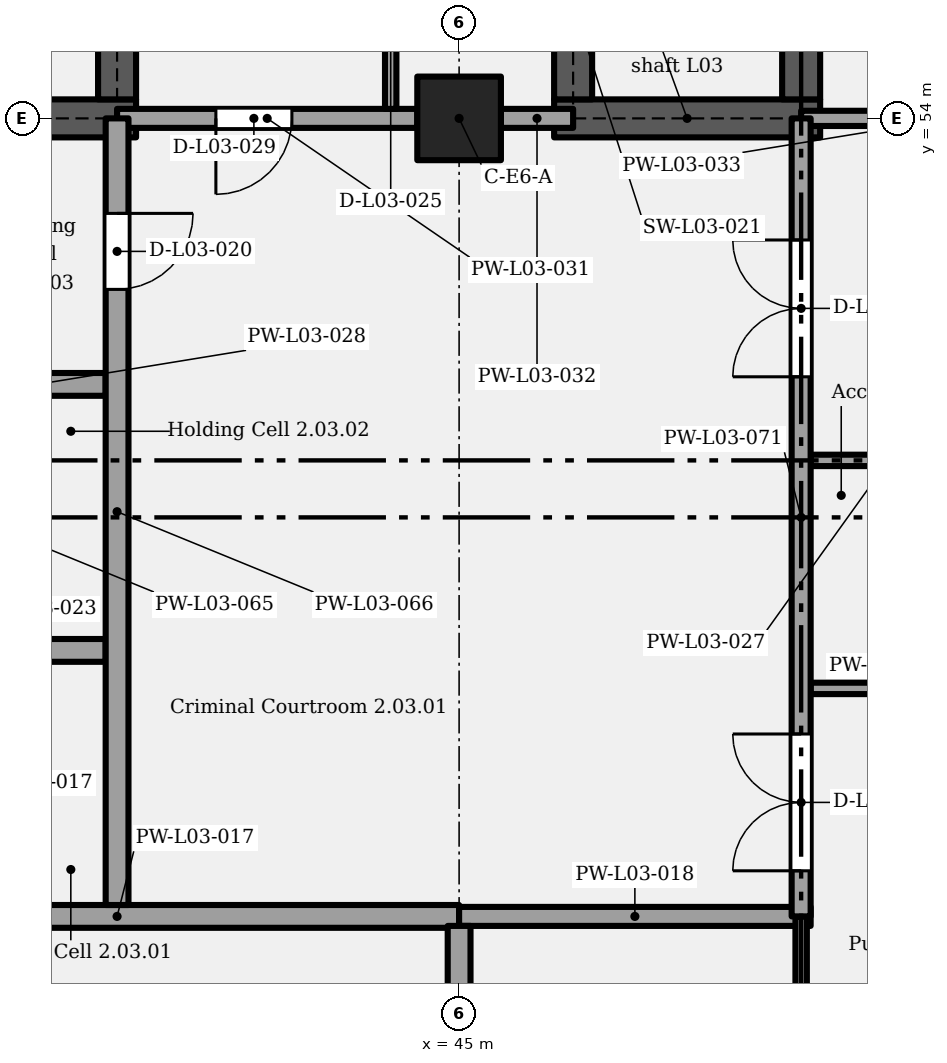
"""IFC4 building model, lengths in metres.
Left out: names, types, materials, properties, quantities, classifications, styles, units other than length and angle.
Written with IfcOpenShell. Run it as: python <this file> out.ifc"""

import sys

from ifc_helpers import new_model, si_unit, direction, frame, frame_2d, origin, origin_2d, place, context, subcontext, project, spatial, rectangle, extrude, element, fill, save


model = new_model("IFC4")
c1 = context("Model", 3, precision=1e-05, world=origin(), true_north=direction((0.0, 1.0)))
c2 = subcontext(c1, "Body", "Model", "MODEL_VIEW")
j1 = project(units=[si_unit("LENGTHUNIT", "METRE"), si_unit("PLANEANGLEUNIT", "RADIAN")], contexts=[c1])
p1 = place(None, origin())
s1 = spatial("IfcSite", under=j1, at=p1, CompositionType="ELEMENT")
p2 = place(p1, origin())
s2 = spatial("IfcBuilding", under=s1, at=p2, CompositionType="ELEMENT")
p3 = place(p2, frame((0.0, 0.0, 17.4)))
s3 = spatial("IfcBuildingStorey", under=s2, at=p3, CompositionType="ELEMENT", Elevation=17.4)
p4 = place(p3, frame((45.0, 54.0, 0.0), z_axis=(0.0, 0.0, 1.0), x_axis=(1.0, 0.0, 0.0)))
e1 = element("IfcColumn", 1, at=p4, inside=s3, PredefinedType="COLUMN", context=c2, shape_type="SweptSolid", body=[
    extrude(rectangle(XDim=1.1, YDim=1.1, at=origin_2d()), origin(), (0.0, 0.0, 1.0), 5.4),
])
p5 = place(p3, frame((38.15, 54.0, 0.0), z_axis=(0.0, 0.0, 1.0), x_axis=(1.0, 0.0, 0.0)))
e2 = element("IfcWall", 2, at=p5, inside=s3, PredefinedType="SHEAR", context=c2, shape_type="SweptSolid", body=[
    extrude(rectangle(XDim=2.6, YDim=0.5, at=frame_2d((1.3, 0.0))), origin(), (0.0, 0.0, 1.0), 5.15),
])
p6 = place(p3, frame((46.25, 54.0, 0.0), z_axis=(0.0, 0.0, 1.0), x_axis=(1.0, 0.0, 0.0)))
e3 = element("IfcWall", 3, at=p6, inside=s3, PredefinedType="SHEAR", context=c2, shape_type="SweptSolid", body=[
    extrude(rectangle(XDim=3.5, YDim=0.5, at=frame_2d((1.75, 0.0))), origin(), (0.0, 0.0, 1.0), 5.15),
])
p7 = place(p3, frame((40.5, 54.25, 0.0), z_axis=(0.0, 0.0, 1.0), x_axis=(0.0, 1.0, 0.0)))
e4 = element("IfcWall", 4, at=p7, inside=s3, PredefinedType="SHEAR", context=c2, shape_type="SweptSolid", body=[
    extrude(rectangle(XDim=11.5, YDim=0.5, at=frame_2d((5.75, 0.0))), origin(), (0.0, 0.0, 1.0), 5.15),
])
p8 = place(p3, frame((46.5, 54.25, 0.0), z_axis=(0.0, 0.0, 1.0), x_axis=(0.0, 1.0, 0.0)))
e5 = element("IfcWall", 5, at=p8, inside=s3, PredefinedType="SHEAR", context=c2, shape_type="SweptSolid", body=[
    extrude(rectangle(XDim=2.5, YDim=0.5, at=frame_2d((1.25, 0.0))), origin(), (0.0, 0.0, 1.0), 5.15),
])
p9 = place(p3, frame((49.5, 54.25, 0.0), z_axis=(0.0, 0.0, 1.0), x_axis=(0.0, 1.0, 0.0)))
e6 = element("IfcWall", 6, at=p9, inside=s3, PredefinedType="SHEAR", context=c2, shape_type="SweptSolid", body=[
    extrude(rectangle(XDim=11.5, YDim=0.5, at=frame_2d((5.75, 0.0))), origin(), (0.0, 0.0, 1.0), 5.15),
])
p10 = place(p9, frame((0.7, 0.0, 0.0)))
e7 = element("IfcOpeningElement", 7, at=p10, cuts=e6, PredefinedType="OPENING", context=c2, shape_type="SweptSolid", body=[
    extrude(rectangle(XDim=1.1, YDim=2.1, at=frame_2d((0.55, 1.05))), frame((0.0, 0.26, 0.0), z_axis=(0.0, -1.0, 0.0), x_axis=(1.0, 0.0, 0.0)), (0.0, 0.0, 1.0), 0.52),
])
p11 = place(p9, frame((4.35, 0.0, 0.0), z_axis=(0.0, 0.0, 1.0), x_axis=(-1.0, 0.0, 0.0)))
e8 = element("IfcOpeningElement", 8, at=p11, cuts=e6, PredefinedType="OPENING", context=c2, shape_type="SweptSolid", body=[
    extrude(rectangle(XDim=1.2, YDim=2.1, at=frame_2d((0.6, 1.05))), frame((0.0, 0.26, 0.0), z_axis=(0.0, -1.0, 0.0), x_axis=(1.0, 0.0, 0.0)), (0.0, 0.0, 1.0), 0.52),
])
p12 = place(p3, frame((36.0, 43.5, 0.0), z_axis=(0.0, 0.0, 1.0), x_axis=(1.0, 0.0, 0.0)))
e9 = element("IfcWall", 9, at=p12, inside=s3, PredefinedType="PARTITIONING", context=c2, shape_type="SweptSolid", body=[
    extrude(rectangle(XDim=9.0, YDim=0.3, at=frame_2d((4.5, 0.0))), origin(), (0.0, 0.0, 1.0), 5.15),
])
p13 = place(p12, frame((1.35, 0.0, 0.0), z_axis=(0.0, 0.0, 1.0), x_axis=(-1.0, 0.0, 0.0)))
e10 = element("IfcOpeningElement", 10, at=p13, cuts=e9, PredefinedType="OPENING", context=c2, shape_type="SweptSolid", body=[
    extrude(rectangle(XDim=0.9, YDim=2.1, at=frame_2d((0.45, 1.05))), frame((0.0, 0.16, 0.0), z_axis=(0.0, -1.0, 0.0), x_axis=(1.0, 0.0, 0.0)), (0.0, 0.0, 1.0), 0.32),
])
p14 = place(p3, frame((45.0, 43.5, 0.0), z_axis=(0.0, 0.0, 1.0), x_axis=(1.0, 0.0, 0.0)))
e11 = element("IfcWall", 11, at=p14, inside=s3, PredefinedType="PARTITIONING", context=c2, shape_type="SweptSolid", body=[
    extrude(rectangle(XDim=4.625, YDim=0.25, at=frame_2d((2.312, 0.0))), origin(), (0.0, 0.0, 1.0), 5.15),
])
p15 = place(p3, frame((49.625, 46.5, 0.0), z_axis=(0.0, 0.0, 1.0), x_axis=(1.0, 0.0, 0.0)))
e12 = element("IfcWall", 12, at=p15, inside=s3, PredefinedType="PARTITIONING", context=c2, shape_type="SweptSolid", body=[
    extrude(rectangle(XDim=2.05, YDim=0.15, at=frame_2d((1.025, 0.0))), origin(), (0.0, 0.0, 1.0), 5.15),
])
p16 = place(p3, frame((38.55, 47.0, 0.0), z_axis=(0.0, 0.0, 1.0), x_axis=(1.0, 0.0, 0.0)))
e13 = element("IfcWall", 13, at=p16, inside=s3, PredefinedType="PARTITIONING", context=c2, shape_type="SweptSolid", body=[
    extrude(rectangle(XDim=1.8, YDim=0.3, at=frame_2d((0.9, 0.0))), origin(), (0.0, 0.0, 1.0), 5.15),
])
p17 = place(p3, frame((49.625, 49.5, 0.0), z_axis=(0.0, 0.0, 1.0), x_axis=(1.0, 0.0, 0.0)))
e14 = element("IfcWall", 14, at=p17, inside=s3, PredefinedType="PARTITIONING", context=c2, shape_type="SweptSolid", body=[
    extrude(rectangle(XDim=2.05, YDim=0.15, at=frame_2d((1.025, 0.0))), origin(), (0.0, 0.0, 1.0), 5.15),
])
p18 = place(p3, frame((38.55, 50.5, 0.0), z_axis=(0.0, 0.0, 1.0), x_axis=(1.0, 0.0, 0.0)))
e15 = element("IfcWall", 15, at=p18, inside=s3, PredefinedType="PARTITIONING", context=c2, shape_type="SweptSolid", body=[
    extrude(rectangle(XDim=1.8, YDim=0.3, at=frame_2d((0.9, 0.0))), origin(), (0.0, 0.0, 1.0), 5.15),
])
p19 = place(p3, frame((40.5, 54.0, 0.0), z_axis=(0.0, 0.0, 1.0), x_axis=(1.0, 0.0, 0.0)))
e16 = element("IfcWall", 16, at=p19, inside=s3, PredefinedType="PARTITIONING", context=c2, shape_type="SweptSolid", body=[
    extrude(rectangle(XDim=3.95, YDim=0.25, at=frame_2d((1.975, 0.0))), origin(), (0.0, 0.0, 1.0), 4.4),
])
p20 = place(p19, frame((2.3, 0.0, 0.0), z_axis=(0.0, 0.0, 1.0), x_axis=(-1.0, 0.0, 0.0)))
e17 = element("IfcOpeningElement", 17, at=p20, cuts=e16, PredefinedType="OPENING", context=c2, shape_type="SweptSolid", body=[
    extrude(rectangle(XDim=1.0, YDim=2.1, at=frame_2d((0.5, 1.05))), frame((0.0, 0.135, 0.0), z_axis=(0.0, -1.0, 0.0), x_axis=(1.0, 0.0, 0.0)), (0.0, 0.0, 1.0), 0.27),
])
p21 = place(p3, frame((45.55, 54.0, 0.0), z_axis=(0.0, 0.0, 1.0), x_axis=(1.0, 0.0, 0.0)))
e18 = element("IfcWall", 18, at=p21, inside=s3, PredefinedType="PARTITIONING", context=c2, shape_type="SweptSolid", body=[
    extrude(rectangle(XDim=0.95, YDim=0.25, at=frame_2d((0.475, 0.0))), origin(), (0.0, 0.0, 1.0), 4.4),
])
p22 = place(p3, frame((49.5, 54.0, 0.0), z_axis=(0.0, 0.0, 1.0), x_axis=(1.0, 0.0, 0.0)))
e19 = element("IfcWall", 19, at=p22, inside=s3, PredefinedType="PARTITIONING", context=c2, shape_type="SweptSolid", body=[
    extrude(rectangle(XDim=3.95, YDim=0.2, at=frame_2d((1.975, 0.0))), origin(), (0.0, 0.0, 1.0), 4.4),
])
p23 = place(p22, frame((1.35, 0.0, 0.0)))
e20 = element("IfcOpeningElement", 20, at=p23, cuts=e19, PredefinedType="OPENING", context=c2, shape_type="SweptSolid", body=[
    extrude(rectangle(XDim=1.8, YDim=2.1, at=frame_2d((0.9, 1.05))), frame((0.0, 0.11, 0.0), z_axis=(0.0, -1.0, 0.0), x_axis=(1.0, 0.0, 0.0)), (0.0, 0.0, 1.0), 0.22),
])
p24 = place(p3, frame((40.5, 43.65, 0.0), z_axis=(0.0, 0.0, 1.0), x_axis=(0.0, 1.0, 0.0)))
e21 = element("IfcWall", 21, at=p24, inside=s3, PredefinedType="PARTITIONING", context=c2, shape_type="SweptSolid", body=[
    extrude(rectangle(XDim=10.35, YDim=0.3, at=frame_2d((5.175, 0.0))), origin(), (0.0, 0.0, 1.0), 5.15),
])
p25 = place(p24, frame((9.1, 0.0, 0.0), z_axis=(0.0, 0.0, 1.0), x_axis=(-1.0, 0.0, 0.0)))
e22 = element("IfcOpeningElement", 22, at=p25, cuts=e21, PredefinedType="OPENING", context=c2, shape_type="SweptSolid", body=[
    extrude(rectangle(XDim=1.0, YDim=2.0, at=frame_2d((0.5, 1.0))), frame((0.0, 0.16, 0.0), z_axis=(0.0, -1.0, 0.0), x_axis=(1.0, 0.0, 0.0)), (0.0, 0.0, 1.0), 0.32),
])
p26 = place(p3, frame((44.1, 54.125, 0.0), z_axis=(0.0, 0.0, 1.0), x_axis=(0.0, 1.0, 0.0)))
e23 = element("IfcWall", 23, at=p26, inside=s3, PredefinedType="PARTITIONING", context=c2, shape_type="SweptSolid", body=[
    extrude(rectangle(XDim=8.8, YDim=0.15, at=frame_2d((4.4, 0.0))), origin(), (0.0, 0.0, 1.0), 5.15),
])
p27 = place(p26, frame((0.875, 0.0, 0.0)))
e24 = element("IfcOpeningElement", 24, at=p27, cuts=e23, PredefinedType="OPENING", context=c2, shape_type="SweptSolid", body=[
    extrude(rectangle(XDim=1.0, YDim=2.1, at=frame_2d((0.5, 1.05))), frame((0.0, 0.085, 0.0), z_axis=(0.0, -1.0, 0.0), x_axis=(1.0, 0.0, 0.0)), (0.0, 0.0, 1.0), 0.17),
])
p28 = place(p26, frame((5.425, 0.0, 0.0)))
e25 = element("IfcOpeningElement", 25, at=p28, cuts=e23, PredefinedType="OPENING", context=c2, shape_type="SweptSolid", body=[
    extrude(rectangle(XDim=0.9, YDim=2.1, at=frame_2d((0.45, 1.05))), frame((0.0, 0.085, 0.0), z_axis=(0.0, -1.0, 0.0), x_axis=(1.0, 0.0, 0.0)), (0.0, 0.0, 1.0), 0.17),
])
p29 = place(p3, frame((45.0, 38.05, 0.0), z_axis=(0.0, 0.0, 1.0), x_axis=(0.0, 1.0, 0.0)))
e26 = element("IfcWall", 26, at=p29, inside=s3, PredefinedType="PARTITIONING", context=c2, shape_type="SweptSolid", body=[
    extrude(rectangle(XDim=5.325, YDim=0.3, at=frame_2d((2.663, 0.0))), origin(), (0.0, 0.0, 1.0), 4.2),
])
p30 = place(p3, frame((49.5, 37.5, 0.0), z_axis=(0.0, 0.0, 1.0), x_axis=(0.0, 1.0, 0.0)))
e27 = element("IfcWall", 27, at=p30, inside=s3, PredefinedType="PARTITIONING", context=c2, shape_type="SweptSolid", body=[
    extrude(rectangle(XDim=6.0, YDim=0.15, at=frame_2d((3.0, 0.0))), origin(), (0.0, 0.0, 1.0), 5.15),
])
p31 = place(p30, frame((1.05, 0.0, 0.0)))
e28 = element("IfcOpeningElement", 28, at=p31, cuts=e27, PredefinedType="OPENING", context=c2, shape_type="SweptSolid", body=[
    extrude(rectangle(XDim=0.9, YDim=2.1, at=frame_2d((0.45, 1.05))), frame((0.0, 0.085, 0.0), z_axis=(0.0, -1.0, 0.0), x_axis=(1.0, 0.0, 0.0)), (0.0, 0.0, 1.0), 0.17),
])
p32 = place(p30, frame((4.05, 0.0, 0.0)))
e29 = element("IfcOpeningElement", 29, at=p32, cuts=e27, PredefinedType="OPENING", context=c2, shape_type="SweptSolid", body=[
    extrude(rectangle(XDim=0.9, YDim=2.1, at=frame_2d((0.45, 1.05))), frame((0.0, 0.085, 0.0), z_axis=(0.0, -1.0, 0.0), x_axis=(1.0, 0.0, 0.0)), (0.0, 0.0, 1.0), 0.17),
])
p33 = place(p3, frame((49.5, 43.5, 0.0), z_axis=(0.0, 0.0, 1.0), x_axis=(0.0, 1.0, 0.0)))
e30 = element("IfcWall", 30, at=p33, inside=s3, PredefinedType="PARTITIONING", context=c2, shape_type="SweptSolid", body=[
    extrude(rectangle(XDim=10.5, YDim=0.25, at=frame_2d((5.25, 0.0))), origin(), (0.0, 0.0, 1.0), 5.15),
])
p34 = place(p33, frame((0.6, 0.0, 0.0)))
e31 = element("IfcOpeningElement", 31, at=p34, cuts=e30, PredefinedType="OPENING", context=c2, shape_type="SweptSolid", body=[
    extrude(rectangle(XDim=1.8, YDim=2.4, at=frame_2d((0.9, 1.2))), frame((0.0, 0.135, 0.0), z_axis=(0.0, -1.0, 0.0), x_axis=(1.0, 0.0, 0.0)), (0.0, 0.0, 1.0), 0.27),
])
p35 = place(p33, frame((7.1, 0.0, 0.0)))
e32 = element("IfcOpeningElement", 32, at=p35, cuts=e30, PredefinedType="OPENING", context=c2, shape_type="SweptSolid", body=[
    extrude(rectangle(XDim=1.8, YDim=2.4, at=frame_2d((0.9, 1.2))), frame((0.0, 0.135, 0.0), z_axis=(0.0, -1.0, 0.0), x_axis=(1.0, 0.0, 0.0)), (0.0, 0.0, 1.0), 0.27),
])
p36 = place(p34, origin())
e33 = element("IfcDoor", 33, at=p36, inside=s3, OperationType="DOUBLE_DOOR_SINGLE_SWING", PredefinedType="DOOR", context=c2, shape_type="SweptSolid", body=[
    extrude(rectangle(XDim=1.8, YDim=2.4, at=frame_2d((0.9, 1.2))), frame((0.0, 0.025, 0.0), z_axis=(0.0, -1.0, 0.0), x_axis=(1.0, 0.0, 0.0)), (0.0, 0.0, 1.0), 0.05),
])
fill(e31, e33)
p37 = place(p35, origin())
e34 = element("IfcDoor", 34, at=p37, inside=s3, OperationType="DOUBLE_DOOR_SINGLE_SWING", PredefinedType="DOOR", context=c2, shape_type="SweptSolid", body=[
    extrude(rectangle(XDim=1.8, YDim=2.4, at=frame_2d((0.9, 1.2))), frame((0.0, 0.025, 0.0), z_axis=(0.0, -1.0, 0.0), x_axis=(1.0, 0.0, 0.0)), (0.0, 0.0, 1.0), 0.05),
])
fill(e32, e34)
p38 = place(p25, origin())
e35 = element("IfcDoor", 35, at=p38, inside=s3, OperationType="SINGLE_SWING_LEFT", PredefinedType="DOOR", context=c2, shape_type="SweptSolid", body=[
    extrude(rectangle(XDim=1.0, YDim=2.0, at=frame_2d((0.5, 1.0))), frame((0.0, 0.025, 0.0), z_axis=(0.0, -1.0, 0.0), x_axis=(1.0, 0.0, 0.0)), (0.0, 0.0, 1.0), 0.05),
])
fill(e22, e35)
p39 = place(p20, origin())
e36 = element("IfcDoor", 36, at=p39, inside=s3, OperationType="SINGLE_SWING_RIGHT", PredefinedType="DOOR", context=c2, shape_type="SweptSolid", body=[
    extrude(rectangle(XDim=1.0, YDim=2.1, at=frame_2d((0.5, 1.05))), frame((0.0, 0.025, 0.0), z_axis=(0.0, -1.0, 0.0), x_axis=(1.0, 0.0, 0.0)), (0.0, 0.0, 1.0), 0.05),
])
fill(e17, e36)
save(model, sys.argv[1])
